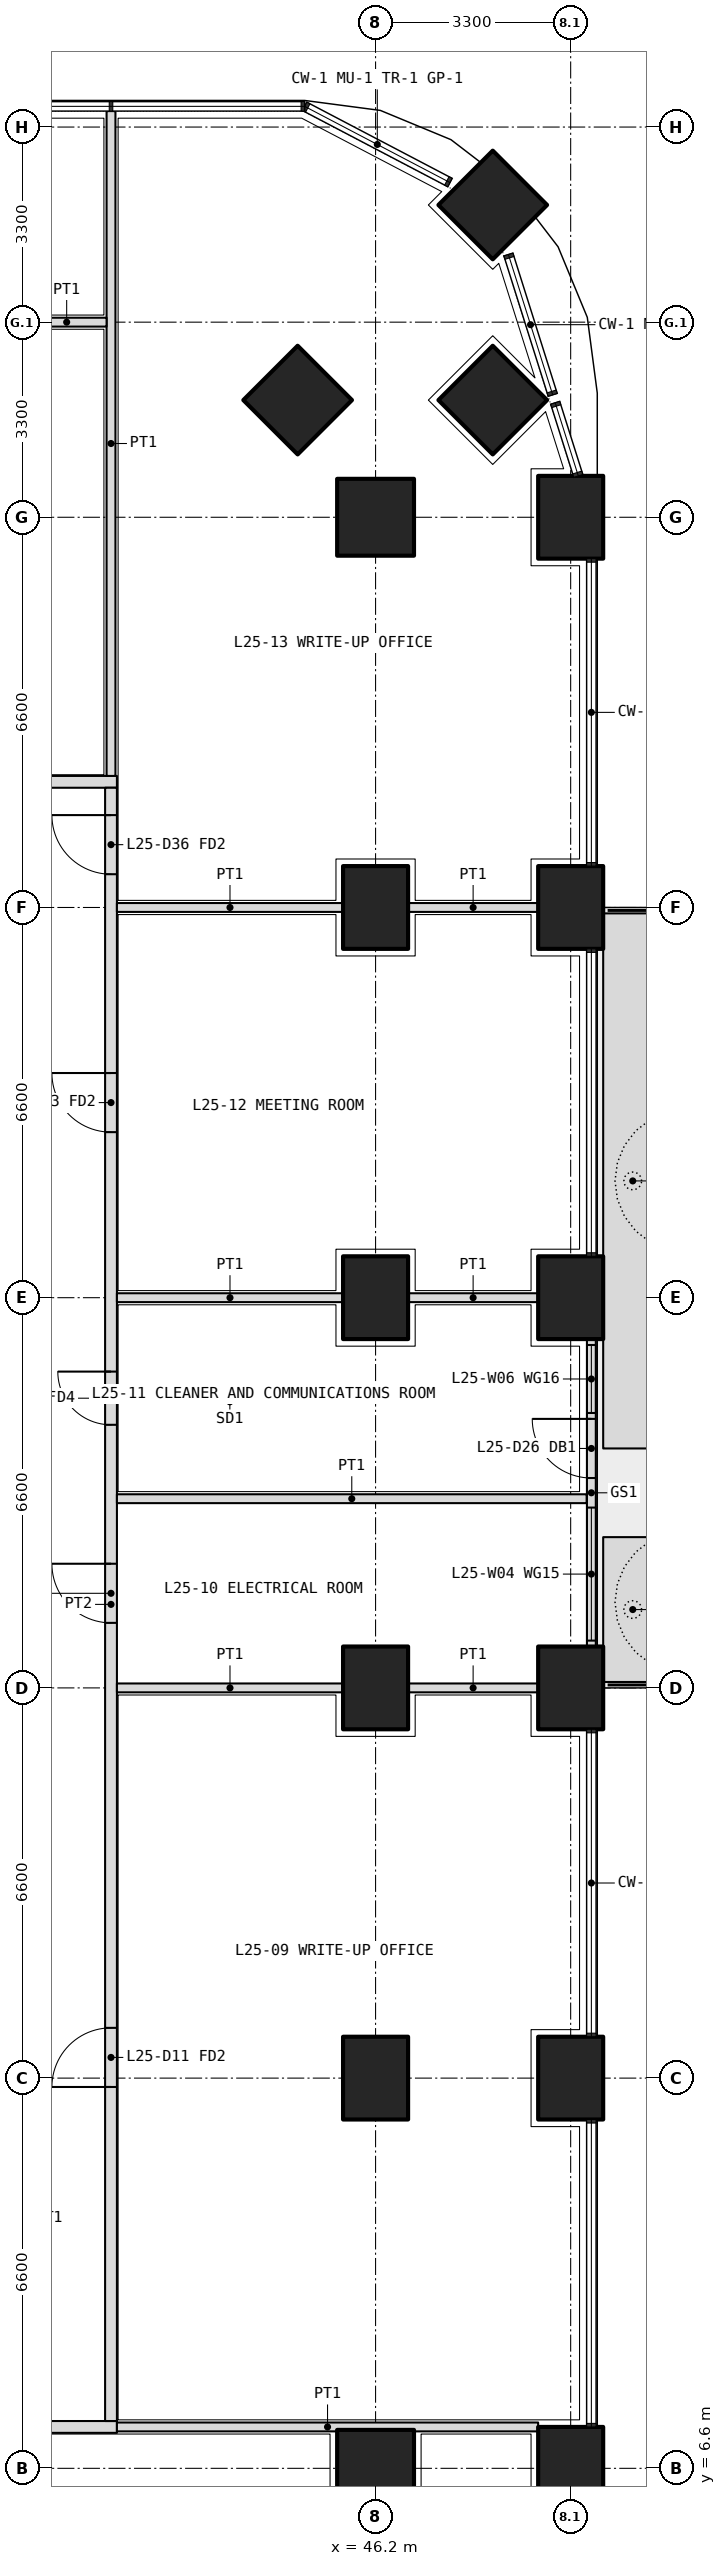
"""IFC4 building model, lengths in metres.
Left out: names, types, materials, properties, quantities, classifications, styles, units other than length and angle.
Written with IfcOpenShell. Run it as: python <this file> out.ifc"""

import sys

from ifc_helpers import new_model, si_unit, direction, frame, frame_2d, origin, origin_2d, place, context, subcontext, project, spatial, polyline, rectangle, outline, extrude, element, fill, save


model = new_model("IFC4")
c1 = context("Model", 3, precision=1e-05, world=origin(), true_north=direction((0.0, 1.0)))
c2 = subcontext(c1, "Body", "Model", "MODEL_VIEW")
j1 = project(units=[si_unit("LENGTHUNIT", "METRE"), si_unit("PLANEANGLEUNIT", "RADIAN")], contexts=[c1])
p1 = place(None, origin())
s1 = spatial("IfcSite", under=j1, at=p1, CompositionType="ELEMENT")
p2 = place(p1, origin())
s2 = spatial("IfcBuilding", under=s1, at=p2, CompositionType="ELEMENT")
p3 = place(p2, frame((0.0, 0.0, 111.6)))
s3 = spatial("IfcBuildingStorey", under=s2, at=p3, CompositionType="ELEMENT", Elevation=111.6)
p4 = place(p3, frame((48.182, 44.882, 0.0), z_axis=(0.0, 0.0, 1.0), x_axis=(0.707106781187, 0.707106781187, 0.0)))
e1 = element("IfcColumn", 1, at=p4, inside=s3, PredefinedType="COLUMN", context=c2, shape_type="SweptSolid", body=[
    extrude(rectangle(XDim=1.3, YDim=1.3, at=origin_2d()), origin(), (0.0, 0.0, 1.0), 4.2),
])
for number, where, z_axis, x_axis in (
    (2, (49.5, 6.6, 0.0), (0.0, 0.0, 1.0), (0.0, 1.0, 0.0)),
    (3, (49.5, 13.2, 0.0), (0.0, 0.0, 1.0), (0.0, 1.0, 0.0)),
    (4, (49.5, 19.8, 0.0), (0.0, 0.0, 1.0), (0.0, 1.0, 0.0)),
    (5, (49.5, 26.4, 0.0), (0.0, 0.0, 1.0), (0.0, 1.0, 0.0)),
    (6, (49.5, 33.0, 0.0), (0.0, 0.0, 1.0), (0.0, 1.0, 0.0)),
    (7, (49.5, 39.6, 0.0), (0.0, 0.0, 1.0), (0.0, 1.0, 0.0)),
):
    element("IfcColumn", number, at=place(p3, frame(where, z_axis=z_axis, x_axis=x_axis)), inside=s3, PredefinedType="COLUMN", context=c2, shape_type="SweptSolid", body=[
        extrude(rectangle(XDim=1.4, YDim=1.1, at=origin_2d()), origin(), (0.0, 0.0, 1.0), 4.2),
    ])
for number, where, z_axis, x_axis in (
    (8, (46.2, 6.6, 0.0), (0.0, 0.0, 1.0), (1.0, 0.0, 0.0)),
    (9, (46.2, 39.6, 0.0), (0.0, 0.0, 1.0), (1.0, 0.0, 0.0)),
    (10, (48.182, 41.582, 0.0), (0.0, 0.0, 1.0), (0.707, 0.707, 0.0)),
    (11, (44.882, 41.582, 0.0), (0.0, 0.0, 1.0), (0.707, 0.707, 0.0)),
):
    element("IfcColumn", number, at=place(p3, frame(where, z_axis=z_axis, x_axis=x_axis)), inside=s3, PredefinedType="COLUMN", context=c2, shape_type="SweptSolid", body=[
        extrude(rectangle(XDim=1.3, YDim=1.3, at=origin_2d()), origin(), (0.0, 0.0, 1.0), 4.2),
    ])
for number, where, z_axis, x_axis in (
    (12, (46.2, 13.2, 0.0), (0.0, 0.0, 1.0), (0.0, 1.0, 0.0)),
    (13, (46.2, 19.8, 0.0), (0.0, 0.0, 1.0), (0.0, 1.0, 0.0)),
    (14, (46.2, 26.4, 0.0), (0.0, 0.0, 1.0), (0.0, 1.0, 0.0)),
    (15, (46.2, 33.0, 0.0), (0.0, 0.0, 1.0), (0.0, 1.0, 0.0)),
):
    element("IfcColumn", number, at=place(p3, frame(where, z_axis=z_axis, x_axis=x_axis)), inside=s3, PredefinedType="COLUMN", context=c2, shape_type="SweptSolid", body=[
        extrude(rectangle(XDim=1.4, YDim=1.1, at=origin_2d()), origin(), (0.0, 0.0, 1.0), 4.2),
    ])
p5 = place(p3, origin())
e16 = element("IfcWall", 16, at=p5, inside=s3, PredefinedType="USERDEFINED", context=c2, shape_type="SweptSolid", body=[
    extrude(outline(polyline([(50.05, 19.9), (51.05, 19.9), (51.05, 22.35), (50.05, 22.35), (50.05, 19.9)]), holes=[polyline([(50.2, 20.05), (50.9, 20.05), (50.9, 22.2), (50.2, 22.2), (50.2, 20.05)])]), origin(), (0.0, 0.0, 1.0), 1.05),
])
p6 = place(p3, origin())
e17 = element("IfcWall", 17, at=p6, inside=s3, PredefinedType="USERDEFINED", context=c2, shape_type="SweptSolid", body=[
    extrude(outline(polyline([(50.05, 23.85), (51.05, 23.85), (51.05, 32.9), (50.05, 32.9), (50.05, 23.85)]), holes=[polyline([(50.2, 24.0), (50.9, 24.0), (50.9, 32.75), (50.2, 32.75), (50.2, 24.0)])]), origin(), (0.0, 0.0, 1.0), 1.05),
])
p7 = place(p3, frame((49.85, 20.5, 0.0), z_axis=(0.0, 0.0, 1.0), x_axis=(0.0, 1.0, 0.0)))
e18 = element("IfcWall", 18, at=p7, inside=s3, PredefinedType="SOLIDWALL", context=c2, shape_type="SweptSolid", body=[
    extrude(rectangle(XDim=5.2, YDim=0.15, at=frame_2d((2.6, 0.0))), origin(), (0.0, 0.0, 1.0), 2.7),
])
p8 = place(p7, frame((2.85, 0.0, 0.0)))
e19 = element("IfcOpeningElement", 19, at=p8, cuts=e18, PredefinedType="OPENING", context=c2, shape_type="SweptSolid", body=[
    extrude(rectangle(XDim=1.0, YDim=2.4, at=frame_2d((0.5, 1.2))), frame((0.0, 0.085, 0.0), z_axis=(0.0, -1.0, 0.0), x_axis=(1.0, 0.0, 0.0)), (0.0, 0.0, 1.0), 0.17),
])
p9 = place(p7, frame((0.1, 0.0, 0.1)))
e20 = element("IfcOpeningElement", 20, at=p9, cuts=e18, PredefinedType="OPENING", context=c2, shape_type="SweptSolid", body=[
    extrude(rectangle(XDim=2.25, YDim=2.3, at=frame_2d((1.125, 1.15))), frame((0.0, 0.085, 0.0), z_axis=(0.0, -1.0, 0.0), x_axis=(1.0, 0.0, 0.0)), (0.0, 0.0, 1.0), 0.17),
])
p10 = place(p7, frame((3.95, 0.0, 0.1)))
e21 = element("IfcOpeningElement", 21, at=p10, cuts=e18, PredefinedType="OPENING", context=c2, shape_type="SweptSolid", body=[
    extrude(rectangle(XDim=1.15, YDim=2.3, at=frame_2d((0.575, 1.15))), frame((0.0, 0.085, 0.0), z_axis=(0.0, -1.0, 0.0), x_axis=(1.0, 0.0, 0.0)), (0.0, 0.0, 1.0), 0.17),
])
p11 = place(p3, frame((26.4, 7.3, 0.0), z_axis=(0.0, 0.0, 1.0), x_axis=(1.0, 0.0, 0.0)))
e22 = element("IfcWall", 22, at=p11, inside=s3, PredefinedType="PARTITIONING", context=c2, shape_type="SweptSolid", body=[
    extrude(rectangle(XDim=15.425, YDim=0.2, at=frame_2d((7.712, 0.0))), origin(), (0.0, 0.0, 1.0), 2.85),
])
p12 = place(p11, frame((7.163, 0.0, 0.0)))
e23 = element("IfcOpeningElement", 23, at=p12, cuts=e22, PredefinedType="OPENING", context=c2, shape_type="SweptSolid", body=[
    extrude(rectangle(XDim=1.0, YDim=2.1, at=frame_2d((0.5, 1.05))), frame((0.0, 0.11, 0.0), z_axis=(0.0, -1.0, 0.0), x_axis=(1.0, 0.0, 0.0)), (0.0, 0.0, 1.0), 0.22),
])
p13 = place(p3, frame((10.975, 35.125, 0.0), z_axis=(0.0, 0.0, 1.0), x_axis=(1.0, 0.0, 0.0)))
e24 = element("IfcWall", 24, at=p13, inside=s3, PredefinedType="PARTITIONING", context=c2, shape_type="SweptSolid", body=[
    extrude(rectangle(XDim=30.85, YDim=0.2, at=frame_2d((15.425, 0.0))), origin(), (0.0, 0.0, 1.0), 2.85),
])
p14 = place(p13, frame((3.962, 0.0, 0.0)))
e25 = element("IfcOpeningElement", 25, at=p14, cuts=e24, PredefinedType="OPENING", context=c2, shape_type="SweptSolid", body=[
    extrude(rectangle(XDim=1.0, YDim=2.1, at=frame_2d((0.5, 1.05))), frame((0.0, 0.11, 0.0), z_axis=(0.0, -1.0, 0.0), x_axis=(1.0, 0.0, 0.0)), (0.0, 0.0, 1.0), 0.22),
])
p15 = place(p13, frame((9.975, 0.0, 0.0)))
e26 = element("IfcOpeningElement", 26, at=p15, cuts=e24, PredefinedType="OPENING", context=c2, shape_type="SweptSolid", body=[
    extrude(rectangle(XDim=1.0, YDim=2.1, at=frame_2d((0.5, 1.05))), frame((0.0, 0.11, 0.0), z_axis=(0.0, -1.0, 0.0), x_axis=(1.0, 0.0, 0.0)), (0.0, 0.0, 1.0), 0.22),
])
p16 = place(p13, frame((14.825, 0.0, 0.0)))
e27 = element("IfcOpeningElement", 27, at=p16, cuts=e24, PredefinedType="OPENING", context=c2, shape_type="SweptSolid", body=[
    extrude(rectangle(XDim=1.2, YDim=2.1, at=frame_2d((0.6, 1.05))), frame((0.0, 0.11, 0.0), z_axis=(0.0, -1.0, 0.0), x_axis=(1.0, 0.0, 0.0)), (0.0, 0.0, 1.0), 0.22),
])
p17 = place(p13, frame((24.238, 0.0, 0.0)))
e28 = element("IfcOpeningElement", 28, at=p17, cuts=e24, PredefinedType="OPENING", context=c2, shape_type="SweptSolid", body=[
    extrude(rectangle(XDim=1.0, YDim=2.1, at=frame_2d((0.5, 1.05))), frame((0.0, 0.11, 0.0), z_axis=(0.0, -1.0, 0.0), x_axis=(1.0, 0.0, 0.0)), (0.0, 0.0, 1.0), 0.22),
])
p18 = place(p3, frame((41.725, 7.4, 0.0), z_axis=(0.0, 0.0, 1.0), x_axis=(0.0, 1.0, 0.0)))
e29 = element("IfcWall", 29, at=p18, inside=s3, PredefinedType="PARTITIONING", context=c2, shape_type="SweptSolid", body=[
    extrude(rectangle(XDim=27.625, YDim=0.2, at=frame_2d((13.812, 0.0))), origin(), (0.0, 0.0, 1.0), 2.85),
])
p19 = place(p18, frame((5.65, 0.0, 0.0)))
e30 = element("IfcOpeningElement", 30, at=p19, cuts=e29, PredefinedType="OPENING", context=c2, shape_type="SweptSolid", body=[
    extrude(rectangle(XDim=1.0, YDim=2.1, at=frame_2d((0.5, 1.05))), frame((0.0, 0.11, 0.0), z_axis=(0.0, -1.0, 0.0), x_axis=(1.0, 0.0, 0.0)), (0.0, 0.0, 1.0), 0.22),
])
p20 = place(p18, frame((13.5, 0.0, 0.0)))
e31 = element("IfcOpeningElement", 31, at=p20, cuts=e29, PredefinedType="OPENING", context=c2, shape_type="SweptSolid", body=[
    extrude(rectangle(XDim=1.0, YDim=2.1, at=frame_2d((0.5, 1.05))), frame((0.0, 0.11, 0.0), z_axis=(0.0, -1.0, 0.0), x_axis=(1.0, 0.0, 0.0)), (0.0, 0.0, 1.0), 0.22),
])
p21 = place(p18, frame((16.85, 0.0, 0.0)))
e32 = element("IfcOpeningElement", 32, at=p21, cuts=e29, PredefinedType="OPENING", context=c2, shape_type="SweptSolid", body=[
    extrude(rectangle(XDim=0.9, YDim=2.1, at=frame_2d((0.45, 1.05))), frame((0.0, 0.11, 0.0), z_axis=(0.0, -1.0, 0.0), x_axis=(1.0, 0.0, 0.0)), (0.0, 0.0, 1.0), 0.22),
])
p22 = place(p18, frame((21.8, 0.0, 0.0)))
e33 = element("IfcOpeningElement", 33, at=p22, cuts=e29, PredefinedType="OPENING", context=c2, shape_type="SweptSolid", body=[
    extrude(rectangle(XDim=1.0, YDim=2.1, at=frame_2d((0.5, 1.05))), frame((0.0, 0.11, 0.0), z_axis=(0.0, -1.0, 0.0), x_axis=(1.0, 0.0, 0.0)), (0.0, 0.0, 1.0), 0.22),
])
p23 = place(p18, frame((26.163, 0.0, 0.0)))
e34 = element("IfcOpeningElement", 34, at=p23, cuts=e29, PredefinedType="OPENING", context=c2, shape_type="SweptSolid", body=[
    extrude(rectangle(XDim=1.0, YDim=2.1, at=frame_2d((0.5, 1.05))), frame((0.0, 0.11, 0.0), z_axis=(0.0, -1.0, 0.0), x_axis=(1.0, 0.0, 0.0)), (0.0, 0.0, 1.0), 0.22),
])
p24 = place(p3, frame((48.95, 7.3, 0.0), z_axis=(0.0, 0.0, 1.0), x_axis=(-1.0, 0.0, 0.0)))
e35 = element("IfcWall", 35, at=p24, inside=s3, PredefinedType="PARTITIONING", context=c2, shape_type="SweptSolid", body=[
    extrude(rectangle(XDim=7.125, YDim=0.15, at=frame_2d((3.562, 0.0))), origin(), (0.0, 0.0, 1.0), 2.85),
])
p25 = place(p3, frame((41.725, 46.47, 0.0), z_axis=(0.0, 0.0, 1.0), x_axis=(0.0, -1.0, 0.0)))
e36 = element("IfcWall", 36, at=p25, inside=s3, PredefinedType="PARTITIONING", context=c2, shape_type="SweptSolid", body=[
    extrude(rectangle(XDim=11.245, YDim=0.15, at=frame_2d((5.623, 0.0))), origin(), (0.0, 0.0, 1.0), 2.7),
])
p26 = place(p3, frame((49.77, 23.0, 0.0), z_axis=(0.0, 0.0, 1.0), x_axis=(-1.0, 0.0, 0.0)))
e37 = element("IfcWall", 37, at=p26, inside=s3, PredefinedType="PARTITIONING", context=c2, shape_type="SweptSolid", body=[
    extrude(rectangle(XDim=7.945, YDim=0.15, at=frame_2d((3.973, 0.0))), origin(), (0.0, 0.0, 1.0), 2.7),
])
p27 = place(p3, frame((48.95, 26.4, 0.0), z_axis=(0.0, 0.0, 1.0), x_axis=(-1.0, 0.0, 0.0)))
e38 = element("IfcWall", 38, at=p27, inside=s3, PredefinedType="PARTITIONING", context=c2, shape_type="SweptSolid", body=[
    extrude(rectangle(XDim=2.2, YDim=0.15, at=frame_2d((1.1, 0.0))), origin(), (0.0, 0.0, 1.0), 2.85),
])
p28 = place(p3, frame((45.65, 26.4, 0.0), z_axis=(0.0, 0.0, 1.0), x_axis=(-1.0, 0.0, 0.0)))
e39 = element("IfcWall", 39, at=p28, inside=s3, PredefinedType="PARTITIONING", context=c2, shape_type="SweptSolid", body=[
    extrude(rectangle(XDim=3.825, YDim=0.15, at=frame_2d((1.913, 0.0))), origin(), (0.0, 0.0, 1.0), 2.85),
])
p29 = place(p3, frame((48.95, 19.8, 0.0), z_axis=(0.0, 0.0, 1.0), x_axis=(-1.0, 0.0, 0.0)))
e40 = element("IfcWall", 40, at=p29, inside=s3, PredefinedType="PARTITIONING", context=c2, shape_type="SweptSolid", body=[
    extrude(rectangle(XDim=2.2, YDim=0.15, at=frame_2d((1.1, 0.0))), origin(), (0.0, 0.0, 1.0), 2.85),
])
p30 = place(p3, frame((45.65, 19.8, 0.0), z_axis=(0.0, 0.0, 1.0), x_axis=(-1.0, 0.0, 0.0)))
e41 = element("IfcWall", 41, at=p30, inside=s3, PredefinedType="PARTITIONING", context=c2, shape_type="SweptSolid", body=[
    extrude(rectangle(XDim=3.825, YDim=0.15, at=frame_2d((1.913, 0.0))), origin(), (0.0, 0.0, 1.0), 2.85),
])
p31 = place(p3, frame((48.95, 33.0, 0.0), z_axis=(0.0, 0.0, 1.0), x_axis=(-1.0, 0.0, 0.0)))
e42 = element("IfcWall", 42, at=p31, inside=s3, PredefinedType="PARTITIONING", context=c2, shape_type="SweptSolid", body=[
    extrude(rectangle(XDim=2.2, YDim=0.15, at=frame_2d((1.1, 0.0))), origin(), (0.0, 0.0, 1.0), 2.85),
])
p32 = place(p3, frame((45.65, 33.0, 0.0), z_axis=(0.0, 0.0, 1.0), x_axis=(-1.0, 0.0, 0.0)))
e43 = element("IfcWall", 43, at=p32, inside=s3, PredefinedType="PARTITIONING", context=c2, shape_type="SweptSolid", body=[
    extrude(rectangle(XDim=3.825, YDim=0.15, at=frame_2d((1.913, 0.0))), origin(), (0.0, 0.0, 1.0), 2.85),
])
p33 = place(p3, frame((41.65, 42.9, 0.0), z_axis=(0.0, 0.0, 1.0), x_axis=(-1.0, 0.0, 0.0)))
e44 = element("IfcWall", 44, at=p33, inside=s3, PredefinedType="PARTITIONING", context=c2, shape_type="SweptSolid", body=[
    extrude(rectangle(XDim=1.35, YDim=0.15, at=frame_2d((0.675, 0.0))), origin(), (0.0, 0.0, 1.0), 3.9),
])
p34 = place(p8, origin())
e45 = element("IfcDoor", 45, at=p34, inside=s3, OperationType="SINGLE_SWING_RIGHT", PredefinedType="DOOR", context=c2, shape_type="SweptSolid", body=[
    extrude(rectangle(XDim=1.0, YDim=2.4, at=frame_2d((0.5, 1.2))), frame((0.0, 0.025, 0.0), z_axis=(0.0, -1.0, 0.0), x_axis=(1.0, 0.0, 0.0)), (0.0, 0.0, 1.0), 0.05),
])
fill(e19, e45)
p35 = place(p9, origin())
e46 = element("IfcWindow", 46, at=p35, inside=s3, PartitioningType="SINGLE_PANEL", PredefinedType="WINDOW", context=c2, shape_type="SweptSolid", body=[
    extrude(rectangle(XDim=2.25, YDim=2.3, at=frame_2d((1.125, 1.15))), frame((0.0, 0.03, 0.0), z_axis=(0.0, -1.0, 0.0), x_axis=(1.0, 0.0, 0.0)), (0.0, 0.0, 1.0), 0.06),
])
fill(e20, e46)
p36 = place(p10, origin())
e47 = element("IfcWindow", 47, at=p36, inside=s3, PartitioningType="SINGLE_PANEL", PredefinedType="WINDOW", context=c2, shape_type="SweptSolid", body=[
    extrude(rectangle(XDim=1.15, YDim=2.3, at=frame_2d((0.575, 1.15))), frame((0.0, 0.03, 0.0), z_axis=(0.0, -1.0, 0.0), x_axis=(1.0, 0.0, 0.0)), (0.0, 0.0, 1.0), 0.06),
])
fill(e21, e47)
p37 = place(p19, origin())
e48 = element("IfcDoor", 48, at=p37, inside=s3, OperationType="SINGLE_SWING_LEFT", PredefinedType="DOOR", context=c2, shape_type="SweptSolid", body=[
    extrude(rectangle(XDim=1.0, YDim=2.1, at=frame_2d((0.5, 1.05))), frame((0.0, 0.025, 0.0), z_axis=(0.0, -1.0, 0.0), x_axis=(1.0, 0.0, 0.0)), (0.0, 0.0, 1.0), 0.05),
])
fill(e30, e48)
p38 = place(p20, origin())
e49 = element("IfcDoor", 49, at=p38, inside=s3, OperationType="SINGLE_SWING_RIGHT", PredefinedType="DOOR", context=c2, shape_type="SweptSolid", body=[
    extrude(rectangle(XDim=1.0, YDim=2.1, at=frame_2d((0.5, 1.05))), frame((0.0, 0.025, 0.0), z_axis=(0.0, -1.0, 0.0), x_axis=(1.0, 0.0, 0.0)), (0.0, 0.0, 1.0), 0.05),
])
fill(e31, e49)
p39 = place(p21, origin())
e50 = element("IfcDoor", 50, at=p39, inside=s3, OperationType="SINGLE_SWING_RIGHT", PredefinedType="DOOR", context=c2, shape_type="SweptSolid", body=[
    extrude(rectangle(XDim=0.9, YDim=2.1, at=frame_2d((0.45, 1.05))), frame((0.0, 0.025, 0.0), z_axis=(0.0, -1.0, 0.0), x_axis=(1.0, 0.0, 0.0)), (0.0, 0.0, 1.0), 0.05),
])
fill(e32, e50)
p40 = place(p22, origin())
e51 = element("IfcDoor", 51, at=p40, inside=s3, OperationType="SINGLE_SWING_RIGHT", PredefinedType="DOOR", context=c2, shape_type="SweptSolid", body=[
    extrude(rectangle(XDim=1.0, YDim=2.1, at=frame_2d((0.5, 1.05))), frame((0.0, 0.025, 0.0), z_axis=(0.0, -1.0, 0.0), x_axis=(1.0, 0.0, 0.0)), (0.0, 0.0, 1.0), 0.05),
])
fill(e33, e51)
p41 = place(p23, origin())
e52 = element("IfcDoor", 52, at=p41, inside=s3, OperationType="SINGLE_SWING_RIGHT", PredefinedType="DOOR", context=c2, shape_type="SweptSolid", body=[
    extrude(rectangle(XDim=1.0, YDim=2.1, at=frame_2d((0.5, 1.05))), frame((0.0, 0.025, 0.0), z_axis=(0.0, -1.0, 0.0), x_axis=(1.0, 0.0, 0.0)), (0.0, 0.0, 1.0), 0.05),
])
fill(e34, e52)
save(model, sys.argv[1])
